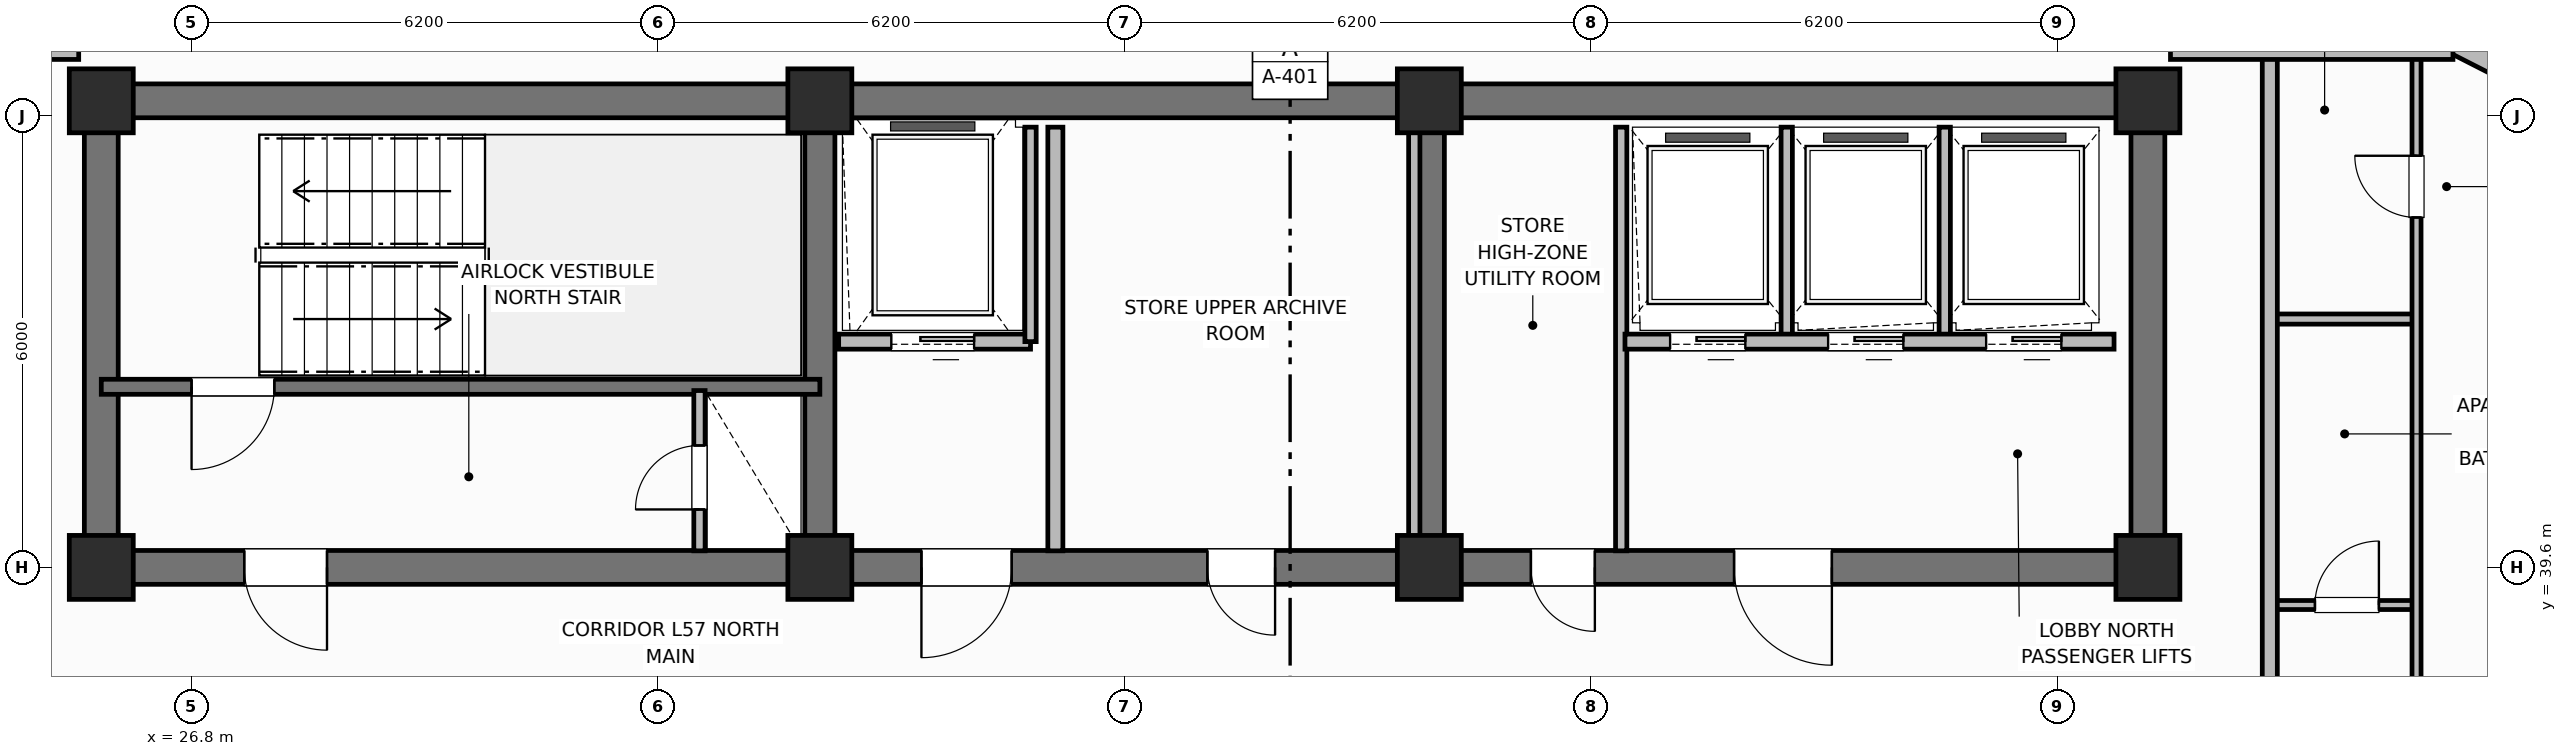
"""IFC4 building model, lengths in metres.
Left out: names, types, materials, properties, quantities, classifications, styles, units other than length and angle.
Written with IfcOpenShell. Run it as: python <this file> out.ifc"""

import sys

from ifc_helpers import new_model, si_unit, direction, frame, frame_2d, origin, origin_2d, place, context, subcontext, project, spatial, rectangle, extrude, element, fill, save


model = new_model("IFC4")
c1 = context("Model", 3, precision=1e-05, world=origin(), true_north=direction((0.0, 1.0)))
c2 = subcontext(c1, "Body", "Model", "MODEL_VIEW")
j1 = project(units=[si_unit("LENGTHUNIT", "METRE"), si_unit("PLANEANGLEUNIT", "RADIAN")], contexts=[c1])
p1 = place(None, origin())
s1 = spatial("IfcSite", under=j1, at=p1, CompositionType="ELEMENT")
p2 = place(p1, origin())
s2 = spatial("IfcBuilding", under=s1, at=p2, CompositionType="ELEMENT")
p3 = place(p2, frame((0.0, 0.0, 229.5)))
s3 = spatial("IfcBuildingStorey", under=s2, at=p3, CompositionType="ELEMENT", Elevation=229.5)
p4 = place(p3, frame((25.6, 45.8, 0.0), z_axis=(0.0, 0.0, 1.0), x_axis=(1.0, 0.0, 0.0)))
e1 = element("IfcWall", 1, at=p4, inside=s3, PredefinedType="SHEAR", context=c2, shape_type="SweptSolid", body=[
    extrude(rectangle(XDim=27.2, YDim=0.45, at=frame_2d((13.6, 0.0))), origin(), (0.0, 0.0, 1.0), 3.7),
])
for number, where, z_axis, x_axis in (
    (2, (25.6, 39.825, 0.0), (0.0, 0.0, 1.0), (0.0, 1.0, 0.0)),
    (3, (52.8, 39.825, 0.0), (0.0, 0.0, 1.0), (0.0, 1.0, 0.0)),
):
    element("IfcWall", number, at=place(p3, frame(where, z_axis=z_axis, x_axis=x_axis)), inside=s3, PredefinedType="SHEAR", context=c2, shape_type="SweptSolid", body=[
        extrude(rectangle(XDim=5.75, YDim=0.45, at=frame_2d((2.875, 0.0))), origin(), (0.0, 0.0, 1.0), 3.7),
    ])
p5 = place(p3, frame((52.8, 39.6, 0.0), z_axis=(0.0, 0.0, 1.0), x_axis=(-1.0, 0.0, 0.0)))
e4 = element("IfcWall", 4, at=p5, inside=s3, PredefinedType="SHEAR", context=c2, shape_type="SweptSolid", body=[
    extrude(rectangle(XDim=27.2, YDim=0.45, at=frame_2d((13.6, 0.0))), origin(), (0.0, 0.0, 1.0), 3.7),
])
p6 = place(p5, frame((24.2, 0.0, 0.0)))
e5 = element("IfcOpeningElement", 5, at=p6, cuts=e4, PredefinedType="OPENING", context=c2, shape_type="SweptSolid", body=[
    extrude(rectangle(XDim=1.1, YDim=2.15, at=frame_2d((0.55, 1.075))), frame((0.0, 0.235, 0.0), z_axis=(0.0, -1.0, 0.0), x_axis=(1.0, 0.0, 0.0)), (0.0, 0.0, 1.0), 0.47),
])
p7 = place(p5, frame((15.1, 0.0, 0.0)))
e6 = element("IfcOpeningElement", 6, at=p7, cuts=e4, PredefinedType="OPENING", context=c2, shape_type="SweptSolid", body=[
    extrude(rectangle(XDim=1.2, YDim=2.15, at=frame_2d((0.6, 1.075))), frame((0.0, 0.235, 0.0), z_axis=(0.0, -1.0, 0.0), x_axis=(1.0, 0.0, 0.0)), (0.0, 0.0, 1.0), 0.47),
])
p8 = place(p5, frame((11.6, 0.0, 0.0)))
e7 = element("IfcOpeningElement", 7, at=p8, cuts=e4, PredefinedType="OPENING", context=c2, shape_type="SweptSolid", body=[
    extrude(rectangle(XDim=0.9, YDim=2.1, at=frame_2d((0.45, 1.05))), frame((0.0, 0.235, 0.0), z_axis=(0.0, -1.0, 0.0), x_axis=(1.0, 0.0, 0.0)), (0.0, 0.0, 1.0), 0.47),
])
p9 = place(p5, frame((7.35, 0.0, 0.0)))
e8 = element("IfcOpeningElement", 8, at=p9, cuts=e4, PredefinedType="OPENING", context=c2, shape_type="SweptSolid", body=[
    extrude(rectangle(XDim=0.85, YDim=2.1, at=frame_2d((0.425, 1.05))), frame((0.0, 0.235, 0.0), z_axis=(0.0, -1.0, 0.0), x_axis=(1.0, 0.0, 0.0)), (0.0, 0.0, 1.0), 0.47),
])
p10 = place(p5, frame((4.2, 0.0, 0.0)))
e9 = element("IfcOpeningElement", 9, at=p10, cuts=e4, PredefinedType="OPENING", context=c2, shape_type="SweptSolid", body=[
    extrude(rectangle(XDim=1.3, YDim=2.2, at=frame_2d((0.65, 1.1))), frame((0.0, 0.235, 0.0), z_axis=(0.0, -1.0, 0.0), x_axis=(1.0, 0.0, 0.0)), (0.0, 0.0, 1.0), 0.47),
])
for number, where, z_axis, x_axis in (
    (10, (35.15, 39.825, 0.0), (0.0, 0.0, 1.0), (0.0, 1.0, 0.0)),
    (11, (43.25, 39.825, 0.0), (0.0, 0.0, 1.0), (0.0, 1.0, 0.0)),
):
    element("IfcWall", number, at=place(p3, frame(where, z_axis=z_axis, x_axis=x_axis)), inside=s3, PredefinedType="SHEAR", context=c2, shape_type="SweptSolid", body=[
        extrude(rectangle(XDim=5.75, YDim=0.4, at=frame_2d((2.875, 0.0))), origin(), (0.0, 0.0, 1.0), 3.7),
    ])
for number, where, z_axis, x_axis in (
    (12, (25.6, 39.6, 0.0), (0.0, 0.0, 1.0), (1.0, 0.0, 0.0)),
    (13, (25.6, 45.8, 0.0), (0.0, 0.0, 1.0), (1.0, 0.0, 0.0)),
    (14, (35.15, 39.6, 0.0), (0.0, 0.0, 1.0), (1.0, 0.0, 0.0)),
    (15, (35.15, 45.8, 0.0), (0.0, 0.0, 1.0), (1.0, 0.0, 0.0)),
    (16, (43.25, 39.6, 0.0), (0.0, 0.0, 1.0), (1.0, 0.0, 0.0)),
    (17, (43.25, 45.8, 0.0), (0.0, 0.0, 1.0), (1.0, 0.0, 0.0)),
    (18, (52.8, 39.6, 0.0), (0.0, 0.0, 1.0), (1.0, 0.0, 0.0)),
    (19, (52.8, 45.8, 0.0), (0.0, 0.0, 1.0), (1.0, 0.0, 0.0)),
):
    element("IfcColumn", number, at=place(p3, frame(where, z_axis=z_axis, x_axis=x_axis)), inside=s3, PredefinedType="COLUMN", context=c2, shape_type="SweptSolid", body=[
        extrude(rectangle(XDim=0.85, YDim=0.85, at=origin_2d()), origin(), (0.0, 0.0, 1.0), 3.7),
    ])
p11 = place(p3, frame((57.633, 46.188, 0.0), z_axis=(0.0, 0.0, 1.0), x_axis=(-0.891076589373, 0.453852962833, 0.0)))
e20 = element("IfcWall", 20, at=p11, inside=s3, PredefinedType="SOLIDWALL", context=c2, shape_type="SweptSolid", body=[
    extrude(rectangle(XDim=0.954, YDim=0.3, at=frame_2d((0.477, 0.0))), origin(), (0.0, 0.0, 1.0), 2.73),
])
p12 = place(p3, frame((35.15, 42.0, 0.0), z_axis=(0.0, 0.0, 1.0), x_axis=(-1.0, 0.0, 0.0)))
e21 = element("IfcWall", 21, at=p12, inside=s3, PredefinedType="SHEAR", context=c2, shape_type="SweptSolid", body=[
    extrude(rectangle(XDim=9.55, YDim=0.2, at=frame_2d((4.775, 0.0))), origin(), (0.0, 0.0, 1.0), 3.7),
])
p13 = place(p12, frame((7.25, 0.0, 0.0)))
e22 = element("IfcOpeningElement", 22, at=p13, cuts=e21, PredefinedType="OPENING", context=c2, shape_type="SweptSolid", body=[
    extrude(rectangle(XDim=1.1, YDim=2.15, at=frame_2d((0.55, 1.075))), frame((0.0, 0.11, 0.0), z_axis=(0.0, -1.0, 0.0), x_axis=(1.0, 0.0, 0.0)), (0.0, 0.0, 1.0), 0.22),
])
p14 = place(p3, frame((33.55, 39.82, 0.0), z_axis=(0.0, 0.0, 1.0), x_axis=(0.0, 1.0, 0.0)))
e23 = element("IfcWall", 23, at=p14, inside=s3, PredefinedType="PARTITIONING", context=c2, shape_type="SweptSolid", body=[
    extrude(rectangle(XDim=2.13, YDim=0.15, at=frame_2d((1.065, 0.0))), origin(), (0.0, 0.0, 1.0), 2.56),
])
p15 = place(p14, frame((0.55, 0.0, 0.0)))
e24 = element("IfcOpeningElement", 24, at=p15, cuts=e23, PredefinedType="OPENING", context=c2, shape_type="SweptSolid", body=[
    extrude(rectangle(XDim=0.85, YDim=2.05, at=frame_2d((0.425, 1.025))), frame((0.0, 0.085, 0.0), z_axis=(0.0, -1.0, 0.0), x_axis=(1.0, 0.0, 0.0)), (0.0, 0.0, 1.0), 0.17),
])
p16 = place(p3, frame((37.95, 42.6, 0.0), z_axis=(0.0, 0.0, 1.0), x_axis=(-1.0, 0.0, 0.0)))
e25 = element("IfcWall", 25, at=p16, inside=s3, PredefinedType="PARTITIONING", context=c2, shape_type="SweptSolid", body=[
    extrude(rectangle(XDim=2.55, YDim=0.2, at=frame_2d((1.275, 0.0))), origin(), (0.0, 0.0, 1.0), 2.33),
])
p17 = place(p16, frame((0.75, 0.0, 0.0)))
e26 = element("IfcOpeningElement", 26, at=p17, cuts=e25, PredefinedType="OPENING", context=c2, shape_type="SweptSolid", body=[
    extrude(rectangle(XDim=1.1, YDim=2.15, at=frame_2d((0.55, 1.075))), frame((0.0, 0.11, 0.0), z_axis=(0.0, -1.0, 0.0), x_axis=(1.0, 0.0, 0.0)), (0.0, 0.0, 1.0), 0.22),
])
p18 = place(p3, frame((37.95, 42.6, 0.0), z_axis=(0.0, 0.0, 1.0), x_axis=(0.0, 1.0, 0.0)))
e27 = element("IfcWall", 27, at=p18, inside=s3, PredefinedType="PARTITIONING", context=c2, shape_type="SweptSolid", body=[
    extrude(rectangle(XDim=2.85, YDim=0.15, at=frame_2d((1.425, 0.0))), origin(), (0.0, 0.0, 1.0), 2.56),
])
p19 = place(p3, frame((38.28, 39.82, 0.0), z_axis=(0.0, 0.0, 1.0), x_axis=(0.0, 1.0, 0.0)))
e28 = element("IfcWall", 28, at=p19, inside=s3, PredefinedType="PARTITIONING", context=c2, shape_type="SweptSolid", body=[
    extrude(rectangle(XDim=5.63, YDim=0.2, at=frame_2d((2.815, 0.0))), origin(), (0.0, 0.0, 1.0), 2.56),
])
for number, where, z_axis, x_axis in (
    (29, (43.05, 39.82, 0.0), (0.0, 0.0, 1.0), (0.0, 1.0, 0.0)),
    (30, (45.8, 39.82, 0.0), (0.0, 0.0, 1.0), (0.0, 1.0, 0.0)),
):
    element("IfcWall", number, at=place(p3, frame(where, z_axis=z_axis, x_axis=x_axis)), inside=s3, PredefinedType="PARTITIONING", context=c2, shape_type="SweptSolid", body=[
        extrude(rectangle(XDim=5.63, YDim=0.15, at=frame_2d((2.815, 0.0))), origin(), (0.0, 0.0, 1.0), 2.56),
    ])
for number, where, z_axis, x_axis in (
    (31, (48.0, 42.65, 0.0), (0.0, 0.0, 1.0), (0.0, 1.0, 0.0)),
    (32, (50.1, 42.65, 0.0), (0.0, 0.0, 1.0), (0.0, 1.0, 0.0)),
):
    element("IfcWall", number, at=place(p3, frame(where, z_axis=z_axis, x_axis=x_axis)), inside=s3, PredefinedType="PARTITIONING", context=c2, shape_type="SweptSolid", body=[
        extrude(rectangle(XDim=2.8, YDim=0.15, at=frame_2d((1.4, 0.0))), origin(), (0.0, 0.0, 1.0), 2.56),
    ])
p20 = place(p3, frame((52.35, 42.6, 0.0), z_axis=(0.0, 0.0, 1.0), x_axis=(-1.0, 0.0, 0.0)))
e33 = element("IfcWall", 33, at=p20, inside=s3, PredefinedType="PARTITIONING", context=c2, shape_type="SweptSolid", body=[
    extrude(rectangle(XDim=6.5, YDim=0.2, at=frame_2d((3.25, 0.0))), origin(), (0.0, 0.0, 1.0), 2.56),
])
p21 = place(p20, frame((4.9, 0.0, 0.0)))
e34 = element("IfcOpeningElement", 34, at=p21, cuts=e33, PredefinedType="OPENING", context=c2, shape_type="SweptSolid", body=[
    extrude(rectangle(XDim=1.0, YDim=2.15, at=frame_2d((0.5, 1.075))), frame((0.0, 0.11, 0.0), z_axis=(0.0, -1.0, 0.0), x_axis=(1.0, 0.0, 0.0)), (0.0, 0.0, 1.0), 0.22),
])
p22 = place(p20, frame((2.8, 0.0, 0.0)))
e35 = element("IfcOpeningElement", 35, at=p22, cuts=e33, PredefinedType="OPENING", context=c2, shape_type="SweptSolid", body=[
    extrude(rectangle(XDim=1.0, YDim=2.15, at=frame_2d((0.5, 1.075))), frame((0.0, 0.11, 0.0), z_axis=(0.0, -1.0, 0.0), x_axis=(1.0, 0.0, 0.0)), (0.0, 0.0, 1.0), 0.22),
])
p23 = place(p20, frame((0.7, 0.0, 0.0)))
e36 = element("IfcOpeningElement", 36, at=p23, cuts=e33, PredefinedType="OPENING", context=c2, shape_type="SweptSolid", body=[
    extrude(rectangle(XDim=1.0, YDim=2.15, at=frame_2d((0.5, 1.075))), frame((0.0, 0.11, 0.0), z_axis=(0.0, -1.0, 0.0), x_axis=(1.0, 0.0, 0.0)), (0.0, 0.0, 1.0), 0.22),
])
p24 = place(p3, frame((21.546, 46.45, 0.0), z_axis=(0.0, 0.0, 1.0), x_axis=(1.0, 0.0, 0.0)))
e37 = element("IfcWall", 37, at=p24, inside=s3, PredefinedType="PARTITIONING", context=c2, shape_type="SweptSolid", body=[
    extrude(rectangle(XDim=3.754, YDim=0.2, at=frame_2d((1.877, 0.0))), origin(), (0.0, 0.0, 1.0), 2.56),
])
p25 = place(p3, frame((54.42, 39.1, 0.0), z_axis=(0.0, 0.0, 1.0), x_axis=(1.0, 0.0, 0.0)))
e38 = element("IfcWall", 38, at=p25, inside=s3, PredefinedType="PARTITIONING", context=c2, shape_type="SweptSolid", body=[
    extrude(rectangle(XDim=1.95, YDim=0.12, at=frame_2d((0.975, 0.0))), origin(), (0.0, 0.0, 1.0), 2.56),
])
p26 = place(p25, frame((0.6, 0.0, 0.0)))
e39 = element("IfcOpeningElement", 39, at=p26, cuts=e38, PredefinedType="OPENING", context=c2, shape_type="SweptSolid", body=[
    extrude(rectangle(XDim=0.85, YDim=2.1, at=frame_2d((0.425, 1.05))), frame((0.0, 0.07, 0.0), z_axis=(0.0, -1.0, 0.0), x_axis=(1.0, 0.0, 0.0)), (0.0, 0.0, 1.0), 0.14),
])
p27 = place(p3, frame((54.42, 42.9, 0.0), z_axis=(0.0, 0.0, 1.0), x_axis=(1.0, 0.0, 0.0)))
e40 = element("IfcWall", 40, at=p27, inside=s3, PredefinedType="PARTITIONING", context=c2, shape_type="SweptSolid", body=[
    extrude(rectangle(XDim=1.95, YDim=0.135, at=frame_2d((0.975, 0.0))), origin(), (0.0, 0.0, 1.0), 2.56),
])
p28 = place(p3, frame((56.37, 33.74, 0.0), z_axis=(0.0, 0.0, 1.0), x_axis=(0.0, 1.0, 0.0)))
e41 = element("IfcWall", 41, at=p28, inside=s3, PredefinedType="PARTITIONING", context=c2, shape_type="SweptSolid", body=[
    extrude(rectangle(XDim=12.67, YDim=0.12, at=frame_2d((6.335, 0.0))), origin(), (0.0, 0.0, 1.0), 2.56),
])
p29 = place(p28, frame((0.61, 0.0, 0.0)))
e42 = element("IfcOpeningElement", 42, at=p29, cuts=e41, PredefinedType="OPENING", context=c2, shape_type="SweptSolid", body=[
    extrude(rectangle(XDim=0.9, YDim=2.1, at=frame_2d((0.45, 1.05))), frame((0.0, 0.07, 0.0), z_axis=(0.0, -1.0, 0.0), x_axis=(1.0, 0.0, 0.0)), (0.0, 0.0, 1.0), 0.14),
])
p30 = place(p28, frame((10.51, 0.0, 0.0)))
e43 = element("IfcOpeningElement", 43, at=p30, cuts=e41, PredefinedType="OPENING", context=c2, shape_type="SweptSolid", body=[
    extrude(rectangle(XDim=0.82, YDim=2.08, at=frame_2d((0.41, 1.04))), frame((0.0, 0.07, 0.0), z_axis=(0.0, -1.0, 0.0), x_axis=(1.0, 0.0, 0.0)), (0.0, 0.0, 1.0), 0.14),
])
p31 = place(p3, frame((54.42, 9.95, 0.0), z_axis=(0.0, 0.0, 1.0), x_axis=(0.0, 1.0, 0.0)))
e44 = element("IfcWall", 44, at=p31, inside=s3, PredefinedType="PARTITIONING", context=c2, shape_type="SweptSolid", body=[
    extrude(rectangle(XDim=36.5, YDim=0.2, at=frame_2d((18.25, 0.0))), origin(), (0.0, 0.0, 1.0), 2.56),
])
p32 = place(p31, frame((3.25, 0.0, 0.0)))
e45 = element("IfcOpeningElement", 45, at=p32, cuts=e44, PredefinedType="OPENING", context=c2, shape_type="SweptSolid", body=[
    extrude(rectangle(XDim=1.0, YDim=2.15, at=frame_2d((0.5, 1.075))), frame((0.0, 0.11, 0.0), z_axis=(0.0, -1.0, 0.0), x_axis=(1.0, 0.0, 0.0)), (0.0, 0.0, 1.0), 0.22),
])
p33 = place(p31, frame((12.96, 0.0, 0.0)))
e46 = element("IfcOpeningElement", 46, at=p33, cuts=e44, PredefinedType="OPENING", context=c2, shape_type="SweptSolid", body=[
    extrude(rectangle(XDim=1.0, YDim=2.15, at=frame_2d((0.5, 1.075))), frame((0.0, 0.11, 0.0), z_axis=(0.0, -1.0, 0.0), x_axis=(1.0, 0.0, 0.0)), (0.0, 0.0, 1.0), 0.22),
])
p34 = place(p31, frame((24.3, 0.0, 0.0)))
e47 = element("IfcOpeningElement", 47, at=p34, cuts=e44, PredefinedType="OPENING", context=c2, shape_type="SweptSolid", body=[
    extrude(rectangle(XDim=1.0, YDim=2.15, at=frame_2d((0.5, 1.075))), frame((0.0, 0.11, 0.0), z_axis=(0.0, -1.0, 0.0), x_axis=(1.0, 0.0, 0.0)), (0.0, 0.0, 1.0), 0.22),
])
p35 = place(p3, frame((53.1, 46.45, 0.0), z_axis=(0.0, 0.0, 1.0), x_axis=(1.0, 0.0, 0.0)))
e48 = element("IfcWall", 48, at=p35, inside=s3, PredefinedType="PARTITIONING", context=c2, shape_type="SweptSolid", body=[
    extrude(rectangle(XDim=3.754, YDim=0.2, at=frame_2d((1.877, 0.0))), origin(), (0.0, 0.0, 1.0), 2.56),
])
p36 = place(p13, origin())
e49 = element("IfcDoor", 49, at=p36, inside=s3, OperationType="SINGLE_SWING_RIGHT", PredefinedType="DOOR", context=c2, shape_type="SweptSolid", body=[
    extrude(rectangle(XDim=1.1, YDim=2.15, at=frame_2d((0.55, 1.075))), frame((0.0, 0.025, 0.0), z_axis=(0.0, -1.0, 0.0), x_axis=(1.0, 0.0, 0.0)), (0.0, 0.0, 1.0), 0.05),
])
fill(e22, e49)
p37 = place(p15, origin())
e50 = element("IfcDoor", 50, at=p37, inside=s3, OperationType="SINGLE_SWING_LEFT", PredefinedType="TRAPDOOR", context=c2, shape_type="SweptSolid", body=[
    extrude(rectangle(XDim=0.85, YDim=2.05, at=frame_2d((0.425, 1.025))), frame((0.0, 0.025, 0.0), z_axis=(0.0, -1.0, 0.0), x_axis=(1.0, 0.0, 0.0)), (0.0, 0.0, 1.0), 0.05),
])
fill(e24, e50)
p38 = place(p17, origin())
e51 = element("IfcDoor", 51, at=p38, inside=s3, OperationType="SLIDING_TO_LEFT", PredefinedType="DOOR", context=c2, shape_type="SweptSolid", body=[
    extrude(rectangle(XDim=1.1, YDim=2.15, at=frame_2d((0.55, 1.075))), frame((0.0, 0.025, 0.0), z_axis=(0.0, -1.0, 0.0), x_axis=(1.0, 0.0, 0.0)), (0.0, 0.0, 1.0), 0.05),
])
fill(e26, e51)
p39 = place(p21, origin())
e52 = element("IfcDoor", 52, at=p39, inside=s3, OperationType="SLIDING_TO_LEFT", PredefinedType="DOOR", context=c2, shape_type="SweptSolid", body=[
    extrude(rectangle(XDim=1.0, YDim=2.15, at=frame_2d((0.5, 1.075))), frame((0.0, 0.025, 0.0), z_axis=(0.0, -1.0, 0.0), x_axis=(1.0, 0.0, 0.0)), (0.0, 0.0, 1.0), 0.05),
])
fill(e34, e52)
p40 = place(p22, origin())
e53 = element("IfcDoor", 53, at=p40, inside=s3, OperationType="SLIDING_TO_LEFT", PredefinedType="DOOR", context=c2, shape_type="SweptSolid", body=[
    extrude(rectangle(XDim=1.0, YDim=2.15, at=frame_2d((0.5, 1.075))), frame((0.0, 0.025, 0.0), z_axis=(0.0, -1.0, 0.0), x_axis=(1.0, 0.0, 0.0)), (0.0, 0.0, 1.0), 0.05),
])
fill(e35, e53)
p41 = place(p23, origin())
e54 = element("IfcDoor", 54, at=p41, inside=s3, OperationType="SLIDING_TO_LEFT", PredefinedType="DOOR", context=c2, shape_type="SweptSolid", body=[
    extrude(rectangle(XDim=1.0, YDim=2.15, at=frame_2d((0.5, 1.075))), frame((0.0, 0.025, 0.0), z_axis=(0.0, -1.0, 0.0), x_axis=(1.0, 0.0, 0.0)), (0.0, 0.0, 1.0), 0.05),
])
fill(e36, e54)
p42 = place(p26, origin())
e55 = element("IfcDoor", 55, at=p42, inside=s3, OperationType="SINGLE_SWING_RIGHT", PredefinedType="DOOR", context=c2, shape_type="SweptSolid", body=[
    extrude(rectangle(XDim=0.85, YDim=2.1, at=frame_2d((0.425, 1.05))), frame((0.0, 0.025, 0.0), z_axis=(0.0, -1.0, 0.0), x_axis=(1.0, 0.0, 0.0)), (0.0, 0.0, 1.0), 0.05),
])
fill(e39, e55)
p43 = place(p30, origin())
e56 = element("IfcDoor", 56, at=p43, inside=s3, OperationType="SINGLE_SWING_RIGHT", PredefinedType="DOOR", context=c2, shape_type="SweptSolid", body=[
    extrude(rectangle(XDim=0.82, YDim=2.08, at=frame_2d((0.41, 1.04))), frame((0.0, 0.025, 0.0), z_axis=(0.0, -1.0, 0.0), x_axis=(1.0, 0.0, 0.0)), (0.0, 0.0, 1.0), 0.05),
])
fill(e43, e56)
p44 = place(p6, origin())
e57 = element("IfcDoor", 57, at=p44, inside=s3, OperationType="SINGLE_SWING_LEFT", PredefinedType="DOOR", context=c2, shape_type="SweptSolid", body=[
    extrude(rectangle(XDim=1.1, YDim=2.15, at=frame_2d((0.55, 1.075))), frame((0.0, 0.025, 0.0), z_axis=(0.0, -1.0, 0.0), x_axis=(1.0, 0.0, 0.0)), (0.0, 0.0, 1.0), 0.05),
])
fill(e5, e57)
p45 = place(p7, origin())
e58 = element("IfcDoor", 58, at=p45, inside=s3, OperationType="SINGLE_SWING_RIGHT", PredefinedType="DOOR", context=c2, shape_type="SweptSolid", body=[
    extrude(rectangle(XDim=1.2, YDim=2.15, at=frame_2d((0.6, 1.075))), frame((0.0, 0.025, 0.0), z_axis=(0.0, -1.0, 0.0), x_axis=(1.0, 0.0, 0.0)), (0.0, 0.0, 1.0), 0.05),
])
fill(e6, e58)
p46 = place(p8, origin())
e59 = element("IfcDoor", 59, at=p46, inside=s3, OperationType="SINGLE_SWING_LEFT", PredefinedType="DOOR", context=c2, shape_type="SweptSolid", body=[
    extrude(rectangle(XDim=0.9, YDim=2.1, at=frame_2d((0.45, 1.05))), frame((0.0, 0.025, 0.0), z_axis=(0.0, -1.0, 0.0), x_axis=(1.0, 0.0, 0.0)), (0.0, 0.0, 1.0), 0.05),
])
fill(e7, e59)
p47 = place(p9, origin())
e60 = element("IfcDoor", 60, at=p47, inside=s3, OperationType="SINGLE_SWING_LEFT", PredefinedType="DOOR", context=c2, shape_type="SweptSolid", body=[
    extrude(rectangle(XDim=0.85, YDim=2.1, at=frame_2d((0.425, 1.05))), frame((0.0, 0.025, 0.0), z_axis=(0.0, -1.0, 0.0), x_axis=(1.0, 0.0, 0.0)), (0.0, 0.0, 1.0), 0.05),
])
fill(e8, e60)
p48 = place(p10, origin())
e61 = element("IfcDoor", 61, at=p48, inside=s3, OperationType="SINGLE_SWING_LEFT", PredefinedType="DOOR", context=c2, shape_type="SweptSolid", body=[
    extrude(rectangle(XDim=1.3, YDim=2.2, at=frame_2d((0.65, 1.1))), frame((0.0, 0.025, 0.0), z_axis=(0.0, -1.0, 0.0), x_axis=(1.0, 0.0, 0.0)), (0.0, 0.0, 1.0), 0.05),
])
fill(e9, e61)
save(model, sys.argv[1])
